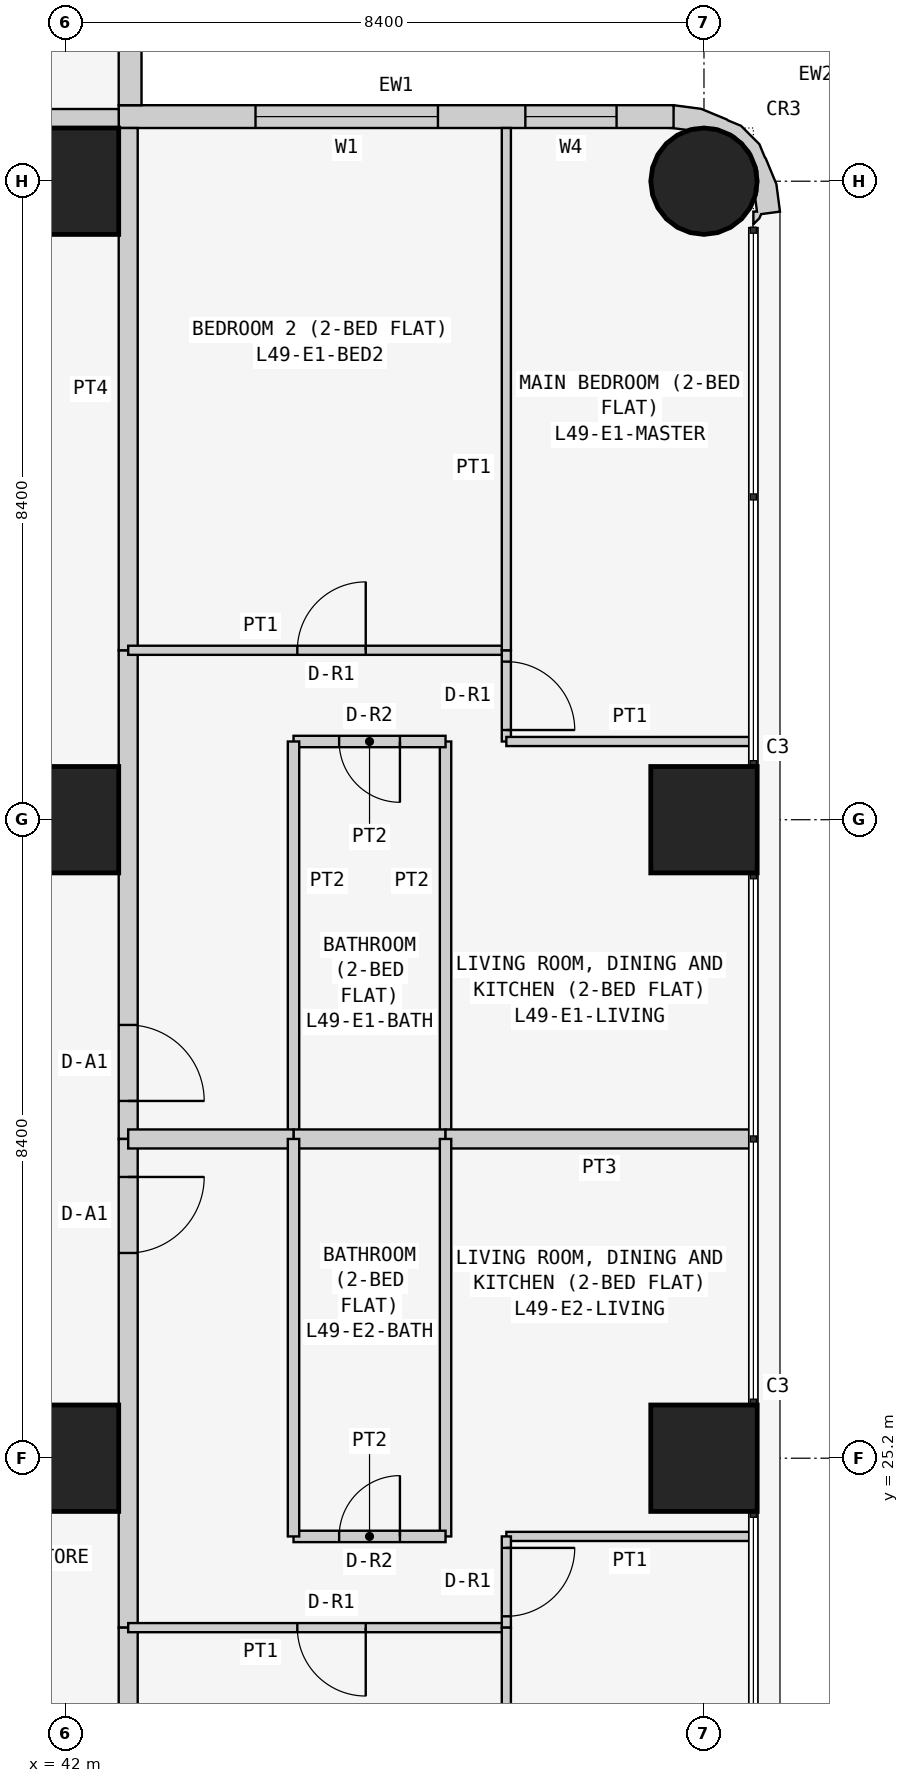
"""IFC4 building model, lengths in metres.
Left out: names, types, materials, properties, quantities, classifications, styles, units other than length and angle.
Written with IfcOpenShell. Run it as: python <this file> out.ifc"""

import sys

from ifc_helpers import new_model, si_unit, direction, frame, frame_2d, origin, origin_2d, place, context, subcontext, project, spatial, polyline, rectangle, circle, outline, extrude, element, fill, save


model = new_model("IFC4")
c1 = context("Model", 3, precision=1e-05, world=origin(), true_north=direction((0.0, 1.0)))
c2 = subcontext(c1, "Body", "Model", "MODEL_VIEW")
j1 = project(units=[si_unit("LENGTHUNIT", "METRE"), si_unit("PLANEANGLEUNIT", "RADIAN")], contexts=[c1])
p1 = place(None, origin())
s1 = spatial("IfcSite", under=j1, at=p1, CompositionType="ELEMENT")
p2 = place(p1, origin())
s2 = spatial("IfcBuilding", under=s1, at=p2, CompositionType="ELEMENT")
p3 = place(p2, frame((0.0, 0.0, 190.5)))
s3 = spatial("IfcBuildingStorey", under=s2, at=p3, CompositionType="ELEMENT", Elevation=190.5)
for number, where, z_axis, x_axis in (
    (1, (42.0, 25.2, 0.0), (0.0, 0.0, 1.0), (1.0, 0.0, 0.0)),
    (2, (42.0, 33.6, 0.0), (0.0, 0.0, 1.0), (1.0, 0.0, 0.0)),
    (3, (42.0, 42.0, 0.0), (0.0, 0.0, 1.0), (1.0, 0.0, 0.0)),
    (4, (50.4, 25.2, 0.0), (0.0, 0.0, 1.0), (1.0, 0.0, 0.0)),
    (5, (50.4, 33.6, 0.0), (0.0, 0.0, 1.0), (1.0, 0.0, 0.0)),
):
    element("IfcColumn", number, at=place(p3, frame(where, z_axis=z_axis, x_axis=x_axis)), inside=s3, PredefinedType="COLUMN", context=c2, shape_type="SweptSolid", body=[
        extrude(rectangle(XDim=1.4, YDim=1.4, at=origin_2d()), origin(), (0.0, 0.0, 1.0), 3.6),
    ])
p4 = place(p3, frame((50.4, 42.0, 0.0), z_axis=(0.0, 0.0, 1.0), x_axis=(1.0, 0.0, 0.0)))
e6 = element("IfcColumn", 6, at=p4, inside=s3, PredefinedType="COLUMN", context=c2, shape_type="SweptSolid", body=[
    extrude(circle(Radius=0.7, at=origin_2d()), origin(), (0.0, 0.0, 1.0), 3.6),
])
p5 = place(p3, frame((50.0, 42.85, 0.0), z_axis=(0.0, 0.0, 1.0), x_axis=(-1.0, 0.0, 0.0)))
e7 = element("IfcWall", 7, at=p5, inside=s3, PredefinedType="SOLIDWALL", context=c2, shape_type="SweptSolid", body=[
    extrude(rectangle(XDim=7.3, YDim=0.3, at=frame_2d((3.65, 0.0))), origin(), (0.0, 0.0, 1.0), 3.45),
])
p6 = place(p5, frame((3.1, 0.0, 0.9)))
e8 = element("IfcOpeningElement", 8, at=p6, cuts=e7, PredefinedType="OPENING", context=c2, shape_type="SweptSolid", body=[
    extrude(rectangle(XDim=2.4, YDim=1.5, at=frame_2d((1.2, 0.75))), frame((0.0, 0.16, 0.0), z_axis=(0.0, -1.0, 0.0), x_axis=(1.0, 0.0, 0.0)), (0.0, 0.0, 1.0), 0.32),
])
p7 = place(p5, frame((0.75, 0.0, 0.9)))
e9 = element("IfcOpeningElement", 9, at=p7, cuts=e7, PredefinedType="OPENING", context=c2, shape_type="SweptSolid", body=[
    extrude(rectangle(XDim=1.2, YDim=1.5, at=frame_2d((0.6, 0.75))), frame((0.0, 0.16, 0.0), z_axis=(0.0, -1.0, 0.0), x_axis=(1.0, 0.0, 0.0)), (0.0, 0.0, 1.0), 0.32),
])
p8 = place(p3, frame((42.85, 43.0, 0.0), z_axis=(0.0, 0.0, 1.0), x_axis=(0.0, 1.0, 0.0)))
e10 = element("IfcWall", 10, at=p8, inside=s3, PredefinedType="SOLIDWALL", context=c2, shape_type="SweptSolid", body=[
    extrude(rectangle(XDim=7.0, YDim=0.3, at=frame_2d((3.5, 0.0))), origin(), (0.0, 0.0, 1.0), 3.45),
])
p9 = place(p8, frame((1.5, 0.0, 0.9)))
e11 = element("IfcOpeningElement", 11, at=p9, cuts=e10, PredefinedType="OPENING", context=c2, shape_type="SweptSolid", body=[
    extrude(rectangle(XDim=2.4, YDim=1.5, at=frame_2d((1.2, 0.75))), frame((0.0, 0.16, 0.0), z_axis=(0.0, -1.0, 0.0), x_axis=(1.0, 0.0, 0.0)), (0.0, 0.0, 1.0), 0.32),
])
p10 = place(p8, frame((5.05, 0.0, 0.9)))
e12 = element("IfcOpeningElement", 12, at=p10, cuts=e10, PredefinedType="OPENING", context=c2, shape_type="SweptSolid", body=[
    extrude(rectangle(XDim=1.2, YDim=1.5, at=frame_2d((0.6, 0.75))), frame((0.0, 0.16, 0.0), z_axis=(0.0, -1.0, 0.0), x_axis=(1.0, 0.0, 0.0)), (0.0, 0.0, 1.0), 0.32),
])
p11 = place(p3, frame((50.988, 41.488, 0.0), z_axis=(0.0, 0.0, 1.0), x_axis=(0.898030234854, 0.439933741929, 0.0)))
e13 = element("IfcWall", 13, at=p11, inside=s3, PredefinedType="SOLIDWALL", context=c2, shape_type="SweptSolid", body=[
    extrude(outline(polyline([(0.138, -0.04), (0.182, -0.0), (0.419, -0.08), (0.536, 0.266), (0.559, 0.631), (0.555, 0.651), (0.566, 0.836), (0.455, 1.159), (0.333, 1.298), (0.324, 1.317), (0.082, 1.591), (-0.222, 1.793), (-0.39, 1.541), (-0.372, 1.532), (-0.195, 1.414), (-0.12, 1.41), (0.131, 1.287), (0.315, 1.078), (0.406, 0.814), (0.388, 0.536), (0.265, 0.285), (0.209, 0.235), (0.148, 0.053), (0.105, 0.074), (0.032, -0.076), (0.138, -0.04)])), origin(), (0.0, 0.0, 1.0), 3.45),
])
p12 = place(p3, frame((35.829, 42.825, 0.0), z_axis=(0.0, 0.0, 1.0), x_axis=(1.0, 0.0, 0.0)))
e14 = element("IfcWall", 14, at=p12, inside=s3, PredefinedType="PARTITIONING", context=c2, shape_type="SweptSolid", body=[
    extrude(rectangle(XDim=6.871, YDim=0.25, at=frame_2d((3.436, 0.0))), origin(), (0.0, 0.0, 1.0), 3.45),
])
p13 = place(p3, frame((42.825, 35.829, 0.0), z_axis=(0.0, 0.0, 1.0), x_axis=(0.0, -1.0, 0.0)))
e15 = element("IfcWall", 15, at=p13, inside=s3, PredefinedType="PARTITIONING", context=c2, shape_type="SweptSolid", body=[
    extrude(rectangle(XDim=6.429, YDim=0.25, at=frame_2d((3.215, 0.0))), origin(), (0.0, 0.0, 1.0), 3.45),
])
p14 = place(p13, frame((4.929, 0.0, 0.0)))
e16 = element("IfcOpeningElement", 16, at=p14, cuts=e15, PredefinedType="OPENING", context=c2, shape_type="SweptSolid", body=[
    extrude(rectangle(XDim=1.0, YDim=2.1, at=frame_2d((0.5, 1.05))), frame((0.0, 0.135, 0.0), z_axis=(0.0, -1.0, 0.0), x_axis=(1.0, 0.0, 0.0)), (0.0, 0.0, 1.0), 0.27),
])
p15 = place(p3, frame((42.825, 42.7, 0.0), z_axis=(0.0, 0.0, 1.0), x_axis=(0.0, -1.0, 0.0)))
e17 = element("IfcWall", 17, at=p15, inside=s3, PredefinedType="PARTITIONING", context=c2, shape_type="SweptSolid", body=[
    extrude(rectangle(XDim=6.871, YDim=0.25, at=frame_2d((3.436, 0.0))), origin(), (0.0, 0.0, 1.0), 3.45),
])
p16 = place(p3, frame((42.825, 29.4, 0.0), z_axis=(0.0, 0.0, 1.0), x_axis=(0.0, -1.0, 0.0)))
e18 = element("IfcWall", 18, at=p16, inside=s3, PredefinedType="PARTITIONING", context=c2, shape_type="SweptSolid", body=[
    extrude(rectangle(XDim=6.429, YDim=0.25, at=frame_2d((3.214, 0.0))), origin(), (0.0, 0.0, 1.0), 3.45),
])
p17 = place(p16, frame((0.5, 0.0, 0.0)))
e19 = element("IfcOpeningElement", 19, at=p17, cuts=e18, PredefinedType="OPENING", context=c2, shape_type="SweptSolid", body=[
    extrude(rectangle(XDim=1.0, YDim=2.1, at=frame_2d((0.5, 1.05))), frame((0.0, 0.135, 0.0), z_axis=(0.0, -1.0, 0.0), x_axis=(1.0, 0.0, 0.0)), (0.0, 0.0, 1.0), 0.27),
])
p18 = place(p3, frame((42.825, 22.971, 0.0), z_axis=(0.0, 0.0, 1.0), x_axis=(0.0, -1.0, 0.0)))
e20 = element("IfcWall", 20, at=p18, inside=s3, PredefinedType="PARTITIONING", context=c2, shape_type="SweptSolid", body=[
    extrude(rectangle(XDim=6.871, YDim=0.25, at=frame_2d((3.436, 0.0))), origin(), (0.0, 0.0, 1.0), 3.45),
])
p19 = place(p3, frame((47.0, 29.4, 0.0), z_axis=(0.0, 0.0, 1.0), x_axis=(0.0, 1.0, 0.0)))
e21 = element("IfcWall", 21, at=p19, inside=s3, PredefinedType="PARTITIONING", context=c2, shape_type="SweptSolid", body=[
    extrude(rectangle(XDim=5.229, YDim=0.15, at=frame_2d((2.615, 0.0))), origin(), (0.0, 0.0, 1.0), 3.45),
])
p20 = place(p3, frame((47.0, 34.629, 0.0), z_axis=(0.0, 0.0, 1.0), x_axis=(-1.0, 0.0, 0.0)))
e22 = element("IfcWall", 22, at=p20, inside=s3, PredefinedType="PARTITIONING", context=c2, shape_type="SweptSolid", body=[
    extrude(rectangle(XDim=2.0, YDim=0.15, at=frame_2d((1.0, 0.0))), origin(), (0.0, 0.0, 1.0), 3.45),
])
p21 = place(p20, frame((0.6, 0.0, 0.0)))
e23 = element("IfcOpeningElement", 23, at=p21, cuts=e22, PredefinedType="OPENING", context=c2, shape_type="SweptSolid", body=[
    extrude(rectangle(XDim=0.8, YDim=2.1, at=frame_2d((0.4, 1.05))), frame((0.0, 0.085, 0.0), z_axis=(0.0, -1.0, 0.0), x_axis=(1.0, 0.0, 0.0)), (0.0, 0.0, 1.0), 0.17),
])
p22 = place(p3, frame((45.0, 34.629, 0.0), z_axis=(0.0, 0.0, 1.0), x_axis=(0.0, -1.0, 0.0)))
e24 = element("IfcWall", 24, at=p22, inside=s3, PredefinedType="PARTITIONING", context=c2, shape_type="SweptSolid", body=[
    extrude(rectangle(XDim=5.229, YDim=0.15, at=frame_2d((2.615, 0.0))), origin(), (0.0, 0.0, 1.0), 3.45),
])
p23 = place(p3, frame((45.0, 29.4, 0.0), z_axis=(0.0, 0.0, 1.0), x_axis=(1.0, 0.0, 0.0)))
e25 = element("IfcWall", 25, at=p23, inside=s3, PredefinedType="PARTITIONING", context=c2, shape_type="SweptSolid", body=[
    extrude(rectangle(XDim=2.0, YDim=0.25, at=frame_2d((1.0, 0.0))), origin(), (0.0, 0.0, 1.0), 3.45),
])
p24 = place(p3, frame((42.825, 35.829, 0.0), z_axis=(0.0, 0.0, 1.0), x_axis=(1.0, 0.0, 0.0)))
e26 = element("IfcWall", 26, at=p24, inside=s3, PredefinedType="PARTITIONING", context=c2, shape_type="SweptSolid", body=[
    extrude(rectangle(XDim=4.975, YDim=0.12, at=frame_2d((2.488, 0.0))), origin(), (0.0, 0.0, 1.0), 3.45),
])
p25 = place(p24, frame((2.225, 0.0, 0.0)))
e27 = element("IfcOpeningElement", 27, at=p25, cuts=e26, PredefinedType="OPENING", context=c2, shape_type="SweptSolid", body=[
    extrude(rectangle(XDim=0.9, YDim=2.1, at=frame_2d((0.45, 1.05))), frame((0.0, 0.07, 0.0), z_axis=(0.0, -1.0, 0.0), x_axis=(1.0, 0.0, 0.0)), (0.0, 0.0, 1.0), 0.14),
])
p26 = place(p3, frame((47.8, 35.829, 0.0), z_axis=(0.0, 0.0, 1.0), x_axis=(0.0, -1.0, 0.0)))
e28 = element("IfcWall", 28, at=p26, inside=s3, PredefinedType="PARTITIONING", context=c2, shape_type="SweptSolid", body=[
    extrude(rectangle(XDim=1.2, YDim=0.12, at=frame_2d((0.6, 0.0))), origin(), (0.0, 0.0, 1.0), 3.45),
])
p27 = place(p26, frame((0.149, 0.0, 0.0)))
e29 = element("IfcOpeningElement", 29, at=p27, cuts=e28, PredefinedType="OPENING", context=c2, shape_type="SweptSolid", body=[
    extrude(rectangle(XDim=0.9, YDim=2.1, at=frame_2d((0.45, 1.05))), frame((0.0, 0.07, 0.0), z_axis=(0.0, -1.0, 0.0), x_axis=(1.0, 0.0, 0.0)), (0.0, 0.0, 1.0), 0.14),
])
p28 = place(p3, frame((47.8, 34.629, 0.0), z_axis=(0.0, 0.0, 1.0), x_axis=(1.0, 0.0, 0.0)))
e30 = element("IfcWall", 30, at=p28, inside=s3, PredefinedType="PARTITIONING", context=c2, shape_type="SweptSolid", body=[
    extrude(rectangle(XDim=3.25, YDim=0.12, at=frame_2d((1.625, 0.0))), origin(), (0.0, 0.0, 1.0), 3.45),
])
p29 = place(p3, frame((45.0, 29.4, 0.0), z_axis=(0.0, 0.0, 1.0), x_axis=(-1.0, 0.0, 0.0)))
e31 = element("IfcWall", 31, at=p29, inside=s3, PredefinedType="PARTITIONING", context=c2, shape_type="SweptSolid", body=[
    extrude(rectangle(XDim=2.175, YDim=0.25, at=frame_2d((1.087, 0.0))), origin(), (0.0, 0.0, 1.0), 3.45),
])
p30 = place(p3, frame((51.05, 29.4, 0.0), z_axis=(0.0, 0.0, 1.0), x_axis=(-1.0, 0.0, 0.0)))
e32 = element("IfcWall", 32, at=p30, inside=s3, PredefinedType="PARTITIONING", context=c2, shape_type="SweptSolid", body=[
    extrude(rectangle(XDim=4.05, YDim=0.25, at=frame_2d((2.025, 0.0))), origin(), (0.0, 0.0, 1.0), 3.45),
])
p31 = place(p3, frame((47.8, 35.829, 0.0), z_axis=(0.0, 0.0, 1.0), x_axis=(0.0, 1.0, 0.0)))
e33 = element("IfcWall", 33, at=p31, inside=s3, PredefinedType="PARTITIONING", context=c2, shape_type="SweptSolid", body=[
    extrude(rectangle(XDim=6.871, YDim=0.12, at=frame_2d((3.436, 0.0))), origin(), (0.0, 0.0, 1.0), 3.45),
])
p32 = place(p3, frame((47.0, 29.4, 0.0), z_axis=(0.0, 0.0, 1.0), x_axis=(0.0, -1.0, 0.0)))
e34 = element("IfcWall", 34, at=p32, inside=s3, PredefinedType="PARTITIONING", context=c2, shape_type="SweptSolid", body=[
    extrude(rectangle(XDim=5.229, YDim=0.15, at=frame_2d((2.615, 0.0))), origin(), (0.0, 0.0, 1.0), 3.45),
])
p33 = place(p3, frame((47.0, 24.171, 0.0), z_axis=(0.0, 0.0, 1.0), x_axis=(-1.0, 0.0, 0.0)))
e35 = element("IfcWall", 35, at=p33, inside=s3, PredefinedType="PARTITIONING", context=c2, shape_type="SweptSolid", body=[
    extrude(rectangle(XDim=2.0, YDim=0.15, at=frame_2d((1.0, 0.0))), origin(), (0.0, 0.0, 1.0), 3.45),
])
p34 = place(p33, frame((0.6, 0.0, 0.0)))
e36 = element("IfcOpeningElement", 36, at=p34, cuts=e35, PredefinedType="OPENING", context=c2, shape_type="SweptSolid", body=[
    extrude(rectangle(XDim=0.8, YDim=2.1, at=frame_2d((0.4, 1.05))), frame((0.0, 0.085, 0.0), z_axis=(0.0, -1.0, 0.0), x_axis=(1.0, 0.0, 0.0)), (0.0, 0.0, 1.0), 0.17),
])
p35 = place(p3, frame((45.0, 24.171, 0.0), z_axis=(0.0, 0.0, 1.0), x_axis=(0.0, 1.0, 0.0)))
e37 = element("IfcWall", 37, at=p35, inside=s3, PredefinedType="PARTITIONING", context=c2, shape_type="SweptSolid", body=[
    extrude(rectangle(XDim=5.229, YDim=0.15, at=frame_2d((2.615, 0.0))), origin(), (0.0, 0.0, 1.0), 3.45),
])
p36 = place(p3, frame((47.8, 22.971, 0.0), z_axis=(0.0, 0.0, 1.0), x_axis=(-1.0, 0.0, 0.0)))
e38 = element("IfcWall", 38, at=p36, inside=s3, PredefinedType="PARTITIONING", context=c2, shape_type="SweptSolid", body=[
    extrude(rectangle(XDim=4.975, YDim=0.12, at=frame_2d((2.488, 0.0))), origin(), (0.0, 0.0, 1.0), 3.45),
])
p37 = place(p36, frame((1.85, 0.0, 0.0)))
e39 = element("IfcOpeningElement", 39, at=p37, cuts=e38, PredefinedType="OPENING", context=c2, shape_type="SweptSolid", body=[
    extrude(rectangle(XDim=0.9, YDim=2.1, at=frame_2d((0.45, 1.05))), frame((0.0, 0.07, 0.0), z_axis=(0.0, -1.0, 0.0), x_axis=(1.0, 0.0, 0.0)), (0.0, 0.0, 1.0), 0.14),
])
p38 = place(p3, frame((51.05, 24.171, 0.0), z_axis=(0.0, 0.0, 1.0), x_axis=(-1.0, 0.0, 0.0)))
e40 = element("IfcWall", 40, at=p38, inside=s3, PredefinedType="PARTITIONING", context=c2, shape_type="SweptSolid", body=[
    extrude(rectangle(XDim=3.25, YDim=0.12, at=frame_2d((1.625, 0.0))), origin(), (0.0, 0.0, 1.0), 3.45),
])
p39 = place(p3, frame((47.8, 24.171, 0.0), z_axis=(0.0, 0.0, 1.0), x_axis=(0.0, -1.0, 0.0)))
e41 = element("IfcWall", 41, at=p39, inside=s3, PredefinedType="PARTITIONING", context=c2, shape_type="SweptSolid", body=[
    extrude(rectangle(XDim=1.2, YDim=0.12, at=frame_2d((0.6, 0.0))), origin(), (0.0, 0.0, 1.0), 3.45),
])
p40 = place(p39, frame((0.151, 0.0, 0.0)))
e42 = element("IfcOpeningElement", 42, at=p40, cuts=e41, PredefinedType="OPENING", context=c2, shape_type="SweptSolid", body=[
    extrude(rectangle(XDim=0.9, YDim=2.1, at=frame_2d((0.45, 1.05))), frame((0.0, 0.07, 0.0), z_axis=(0.0, -1.0, 0.0), x_axis=(1.0, 0.0, 0.0)), (0.0, 0.0, 1.0), 0.14),
])
p41 = place(p3, frame((47.8, 22.971, 0.0), z_axis=(0.0, 0.0, 1.0), x_axis=(0.0, -1.0, 0.0)))
e43 = element("IfcWall", 43, at=p41, inside=s3, PredefinedType="PARTITIONING", context=c2, shape_type="SweptSolid", body=[
    extrude(rectangle(XDim=6.871, YDim=0.12, at=frame_2d((3.436, 0.0))), origin(), (0.0, 0.0, 1.0), 3.45),
])
p42 = place(p6, origin())
e44 = element("IfcWindow", 44, at=p42, inside=s3, PartitioningType="SINGLE_PANEL", PredefinedType="WINDOW", context=c2, shape_type="SweptSolid", body=[
    extrude(rectangle(XDim=2.4, YDim=1.5, at=frame_2d((1.2, 0.75))), frame((0.0, 0.03, 0.0), z_axis=(0.0, -1.0, 0.0), x_axis=(1.0, 0.0, 0.0)), (0.0, 0.0, 1.0), 0.06),
])
fill(e8, e44)
p43 = place(p7, origin())
e45 = element("IfcWindow", 45, at=p43, inside=s3, PartitioningType="SINGLE_PANEL", PredefinedType="WINDOW", context=c2, shape_type="SweptSolid", body=[
    extrude(rectangle(XDim=1.2, YDim=1.5, at=frame_2d((0.6, 0.75))), frame((0.0, 0.03, 0.0), z_axis=(0.0, -1.0, 0.0), x_axis=(1.0, 0.0, 0.0)), (0.0, 0.0, 1.0), 0.06),
])
fill(e9, e45)
p44 = place(p14, origin())
e46 = element("IfcDoor", 46, at=p44, inside=s3, OperationType="SINGLE_SWING_RIGHT", PredefinedType="DOOR", context=c2, shape_type="SweptSolid", body=[
    extrude(rectangle(XDim=1.0, YDim=2.1, at=frame_2d((0.5, 1.05))), frame((0.0, 0.025, 0.0), z_axis=(0.0, -1.0, 0.0), x_axis=(1.0, 0.0, 0.0)), (0.0, 0.0, 1.0), 0.05),
])
fill(e16, e46)
p45 = place(p21, origin())
e47 = element("IfcDoor", 47, at=p45, inside=s3, OperationType="SINGLE_SWING_LEFT", PredefinedType="DOOR", context=c2, shape_type="SweptSolid", body=[
    extrude(rectangle(XDim=0.8, YDim=2.1, at=frame_2d((0.4, 1.05))), frame((0.0, 0.025, 0.0), z_axis=(0.0, -1.0, 0.0), x_axis=(1.0, 0.0, 0.0)), (0.0, 0.0, 1.0), 0.05),
])
fill(e23, e47)
p46 = place(p25, origin())
e48 = element("IfcDoor", 48, at=p46, inside=s3, OperationType="SINGLE_SWING_RIGHT", PredefinedType="DOOR", context=c2, shape_type="SweptSolid", body=[
    extrude(rectangle(XDim=0.9, YDim=2.1, at=frame_2d((0.45, 1.05))), frame((0.0, 0.025, 0.0), z_axis=(0.0, -1.0, 0.0), x_axis=(1.0, 0.0, 0.0)), (0.0, 0.0, 1.0), 0.05),
])
fill(e27, e48)
p47 = place(p27, origin())
e49 = element("IfcDoor", 49, at=p47, inside=s3, OperationType="SINGLE_SWING_RIGHT", PredefinedType="DOOR", context=c2, shape_type="SweptSolid", body=[
    extrude(rectangle(XDim=0.9, YDim=2.1, at=frame_2d((0.45, 1.05))), frame((0.0, 0.025, 0.0), z_axis=(0.0, -1.0, 0.0), x_axis=(1.0, 0.0, 0.0)), (0.0, 0.0, 1.0), 0.05),
])
fill(e29, e49)
p48 = place(p17, origin())
e50 = element("IfcDoor", 50, at=p48, inside=s3, OperationType="SINGLE_SWING_LEFT", PredefinedType="DOOR", context=c2, shape_type="SweptSolid", body=[
    extrude(rectangle(XDim=1.0, YDim=2.1, at=frame_2d((0.5, 1.05))), frame((0.0, 0.025, 0.0), z_axis=(0.0, -1.0, 0.0), x_axis=(1.0, 0.0, 0.0)), (0.0, 0.0, 1.0), 0.05),
])
fill(e19, e50)
p49 = place(p34, frame((0.8, 0.0, 0.0), z_axis=(0.0, 0.0, 1.0), x_axis=(-1.0, 0.0, 0.0)))
e51 = element("IfcDoor", 51, at=p49, inside=s3, OperationType="SINGLE_SWING_RIGHT", PredefinedType="DOOR", context=c2, shape_type="SweptSolid", body=[
    extrude(rectangle(XDim=0.8, YDim=2.1, at=frame_2d((0.4, 1.05))), frame((0.0, 0.025, 0.0), z_axis=(0.0, -1.0, 0.0), x_axis=(1.0, 0.0, 0.0)), (0.0, 0.0, 1.0), 0.05),
])
fill(e36, e51)
p50 = place(p37, origin())
e52 = element("IfcDoor", 52, at=p50, inside=s3, OperationType="SINGLE_SWING_LEFT", PredefinedType="DOOR", context=c2, shape_type="SweptSolid", body=[
    extrude(rectangle(XDim=0.9, YDim=2.1, at=frame_2d((0.45, 1.05))), frame((0.0, 0.025, 0.0), z_axis=(0.0, -1.0, 0.0), x_axis=(1.0, 0.0, 0.0)), (0.0, 0.0, 1.0), 0.05),
])
fill(e39, e52)
p51 = place(p40, origin())
e53 = element("IfcDoor", 53, at=p51, inside=s3, OperationType="SINGLE_SWING_LEFT", PredefinedType="DOOR", context=c2, shape_type="SweptSolid", body=[
    extrude(rectangle(XDim=0.9, YDim=2.1, at=frame_2d((0.45, 1.05))), frame((0.0, 0.025, 0.0), z_axis=(0.0, -1.0, 0.0), x_axis=(1.0, 0.0, 0.0)), (0.0, 0.0, 1.0), 0.05),
])
fill(e42, e53)
save(model, sys.argv[1])
